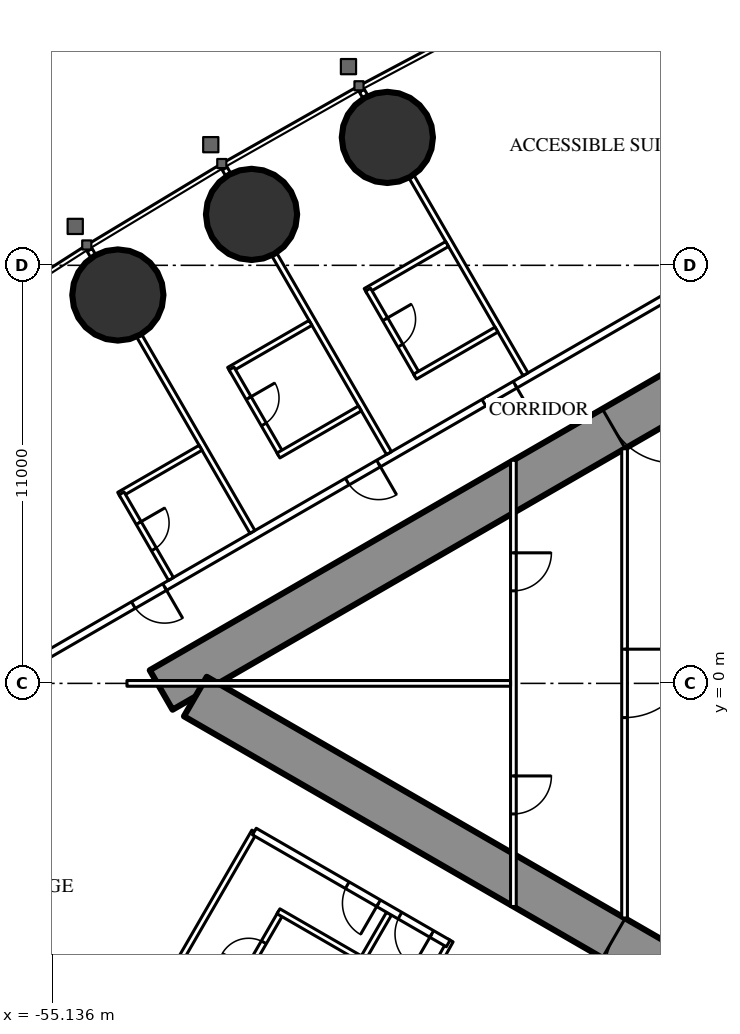
"""IFC4 building model, lengths in metres.
Left out: names, types, materials, properties, quantities, classifications, styles, units other than length and angle.
Written with IfcOpenShell. Run it as: python <this file> out.ifc"""

import sys

from ifc_helpers import new_model, si_unit, direction, frame, frame_2d, origin, origin_2d, place, context, subcontext, project, spatial, rectangle, circle, extrude, element, fill, save


model = new_model("IFC4")
c1 = context("Model", 3, precision=1e-05, world=origin(), true_north=direction((0.0, 1.0)))
c2 = subcontext(c1, "Body", "Model", "MODEL_VIEW")
j1 = project(units=[si_unit("LENGTHUNIT", "METRE"), si_unit("PLANEANGLEUNIT", "RADIAN")], contexts=[c1])
p1 = place(None, origin())
s1 = spatial("IfcSite", under=j1, at=p1, CompositionType="ELEMENT")
p2 = place(p1, origin())
s2 = spatial("IfcBuilding", under=s1, at=p2, CompositionType="ELEMENT")
p3 = place(p2, frame((0.0, 0.0, 236.9)))
s3 = spatial("IfcBuildingStorey", under=s2, at=p3, CompositionType="ELEMENT", Elevation=236.9)
for number, where, z_axis, x_axis in (
    (1, (-46.317, 14.365, 0.0), (0.0, 0.0, 1.0), (1.0, 0.0, 0.0)),
    (2, (-49.89, 12.34, 0.0), (0.0, 0.0, 1.0), (1.0, 0.0, 0.0)),
    (3, (-53.408, 10.219, 0.0), (0.0, 0.0, 1.0), (1.0, 0.0, 0.0)),
):
    element("IfcColumn", number, at=place(p3, frame(where, z_axis=z_axis, x_axis=x_axis)), inside=s3, PredefinedType="COLUMN", context=c2, shape_type="SweptSolid", body=[
        extrude(circle(Radius=1.2, at=origin_2d()), origin(), (0.0, 0.0, 1.0), 3.6),
    ])
p4 = place(p3, frame((-27.2, 14.3, 0.0), z_axis=(0.0, 0.0, 1.0), x_axis=(-0.866026593062, -0.499997940104, 0.0)))
e4 = element("IfcWall", 4, at=p4, inside=s3, PredefinedType="SHEAR", context=c2, shape_type="SweptSolid", body=[
    extrude(rectangle(XDim=28.946, YDim=1.2, at=frame_2d((14.473, 0.0))), origin(), (0.0, 0.0, 1.0), 3.6),
])
p5 = place(p4, frame((4.6, 0.0, 0.0)))
e5 = element("IfcOpeningElement", 5, at=p5, cuts=e4, PredefinedType="OPENING", context=c2, shape_type="SweptSolid", body=[
    extrude(rectangle(XDim=1.0, YDim=2.2, at=frame_2d((0.5, 1.1))), frame((0.0, 0.61, 0.0), z_axis=(0.0, -1.0, 0.0), x_axis=(1.0, 0.0, 0.0)), (0.0, 0.0, 1.0), 1.22),
])
p6 = place(p4, frame((13.395, 0.0, 0.0)))
e6 = element("IfcOpeningElement", 6, at=p6, cuts=e4, PredefinedType="OPENING", context=c2, shape_type="SweptSolid", body=[
    extrude(rectangle(XDim=1.8, YDim=2.2, at=frame_2d((0.9, 1.1))), frame((0.0, 0.61, 0.0), z_axis=(0.0, -1.0, 0.0), x_axis=(1.0, 0.0, 0.0)), (0.0, 0.0, 1.0), 1.22),
])
p7 = place(p3, frame((-27.2, -14.3, 0.0), z_axis=(0.0, 0.0, 1.0), x_axis=(-0.866024021859, 0.500002393557, 0.0)))
e7 = element("IfcWall", 7, at=p7, inside=s3, PredefinedType="SHEAR", context=c2, shape_type="SweptSolid", body=[
    extrude(rectangle(XDim=27.907, YDim=1.2, at=frame_2d((13.954, 0.0))), origin(), (0.0, 0.0, 1.0), 3.6),
])
p8 = place(p7, frame((4.6, 0.0, 0.0)))
e8 = element("IfcOpeningElement", 8, at=p8, cuts=e7, PredefinedType="OPENING", context=c2, shape_type="SweptSolid", body=[
    extrude(rectangle(XDim=1.0, YDim=2.2, at=frame_2d((0.5, 1.1))), frame((0.0, 0.61, 0.0), z_axis=(0.0, -1.0, 0.0), x_axis=(1.0, 0.0, 0.0)), (0.0, 0.0, 1.0), 1.22),
])
p9 = place(p7, frame((13.395, 0.0, 0.0)))
e9 = element("IfcOpeningElement", 9, at=p9, cuts=e7, PredefinedType="OPENING", context=c2, shape_type="SweptSolid", body=[
    extrude(rectangle(XDim=1.8, YDim=2.2, at=frame_2d((0.9, 1.1))), frame((0.0, 0.61, 0.0), z_axis=(0.0, -1.0, 0.0), x_axis=(1.0, 0.0, 0.0)), (0.0, 0.0, 1.0), 1.22),
])
p10 = place(p3, frame((-28.737, 16.068, 0.0), z_axis=(0.0, 0.0, 1.0), x_axis=(-0.866026057212, -0.499998868229, 0.0)))
e10 = element("IfcWall", 10, at=p10, inside=s3, PredefinedType="PARTITIONING", context=c2, shape_type="SweptSolid", body=[
    extrude(rectangle(XDim=32.137, YDim=0.2, at=frame_2d((16.068, 0.0))), origin(), (0.0, 0.0, 1.0), 3.35),
])
p11 = place(p10, frame((1.08, 0.0, 0.0)))
e11 = element("IfcOpeningElement", 11, at=p11, cuts=e10, PredefinedType="OPENING", context=c2, shape_type="SweptSolid", body=[
    extrude(rectangle(XDim=1.8, YDim=2.03, at=frame_2d((0.9, 1.015))), frame((0.0, 0.11, 0.0), z_axis=(0.0, -1.0, 0.0), x_axis=(1.0, 0.0, 0.0)), (0.0, 0.0, 1.0), 0.22),
])
p12 = place(p10, frame((6.86, 0.0, 0.0)))
e12 = element("IfcOpeningElement", 12, at=p12, cuts=e10, PredefinedType="OPENING", context=c2, shape_type="SweptSolid", body=[
    extrude(rectangle(XDim=1.0, YDim=2.2, at=frame_2d((0.5, 1.1))), frame((0.0, 0.11, 0.0), z_axis=(0.0, -1.0, 0.0), x_axis=(1.0, 0.0, 0.0)), (0.0, 0.0, 1.0), 0.22),
])
p13 = place(p10, frame((16.418, 0.0, 0.0)))
e13 = element("IfcOpeningElement", 13, at=p13, cuts=e10, PredefinedType="OPENING", context=c2, shape_type="SweptSolid", body=[
    extrude(rectangle(XDim=0.95, YDim=2.2, at=frame_2d((0.475, 1.1))), frame((0.0, 0.11, 0.0), z_axis=(0.0, -1.0, 0.0), x_axis=(1.0, 0.0, 0.0)), (0.0, 0.0, 1.0), 0.22),
])
p14 = place(p10, frame((20.567, 0.0, 0.0)))
e14 = element("IfcOpeningElement", 14, at=p14, cuts=e10, PredefinedType="OPENING", context=c2, shape_type="SweptSolid", body=[
    extrude(rectangle(XDim=0.95, YDim=2.2, at=frame_2d((0.475, 1.1))), frame((0.0, 0.11, 0.0), z_axis=(0.0, -1.0, 0.0), x_axis=(1.0, 0.0, 0.0)), (0.0, 0.0, 1.0), 0.22),
])
p15 = place(p10, frame((27.065, 0.0, 0.0)))
e15 = element("IfcOpeningElement", 15, at=p15, cuts=e10, PredefinedType="OPENING", context=c2, shape_type="SweptSolid", body=[
    extrude(rectangle(XDim=0.95, YDim=2.2, at=frame_2d((0.475, 1.1))), frame((0.0, 0.11, 0.0), z_axis=(0.0, -1.0, 0.0), x_axis=(1.0, 0.0, 0.0)), (0.0, 0.0, 1.0), 0.22),
])
p16 = place(p3, frame((-42.68, 8.134, 0.0), z_axis=(0.0, 0.0, 1.0), x_axis=(-0.499984479505, 0.866034364361, 0.0)))
e16 = element("IfcWall", 16, at=p16, inside=s3, PredefinedType="PARTITIONING", context=c2, shape_type="SweptSolid", body=[
    extrude(rectangle(XDim=5.995, YDim=0.15, at=frame_2d((2.998, 0.0))), origin(), (0.0, 0.0, 1.0), 2.45),
])
p17 = place(p3, frame((-46.898, 15.439, 0.0), z_axis=(0.0, 0.0, 1.0), x_axis=(-0.500232303069, 0.865891241997, 0.0)))
e17 = element("IfcWall", 17, at=p17, inside=s3, PredefinedType="PARTITIONING", context=c2, shape_type="SweptSolid", body=[
    extrude(rectangle(XDim=0.18, YDim=0.15, at=frame_2d((0.09, 0.0))), origin(), (0.0, 0.0, 1.0), 2.45),
])
p18 = place(p3, frame((-46.274, 6.059, 0.0), z_axis=(0.0, 0.0, 1.0), x_axis=(-0.500020471368, 0.866013584312, 0.0)))
e18 = element("IfcWall", 18, at=p18, inside=s3, PredefinedType="PARTITIONING", context=c2, shape_type="SweptSolid", body=[
    extrude(rectangle(XDim=6.028, YDim=0.15, at=frame_2d((3.014, 0.0))), origin(), (0.0, 0.0, 1.0), 2.45),
])
p19 = place(p3, frame((-50.508, 13.392, 0.0), z_axis=(0.0, 0.0, 1.0), x_axis=(-0.499644091975, 0.866230789891, 0.0)))
e19 = element("IfcWall", 19, at=p19, inside=s3, PredefinedType="PARTITIONING", context=c2, shape_type="SweptSolid", body=[
    extrude(rectangle(XDim=0.18, YDim=0.15, at=frame_2d((0.09, 0.0))), origin(), (0.0, 0.0, 1.0), 2.45),
])
p20 = place(p3, frame((-49.866, 3.985, 0.0), z_axis=(0.0, 0.0, 1.0), x_axis=(-0.500000694566, 0.866025002776, 0.0)))
e20 = element("IfcWall", 20, at=p20, inside=s3, PredefinedType="PARTITIONING", context=c2, shape_type="SweptSolid", body=[
    extrude(rectangle(XDim=5.95, YDim=0.15, at=frame_2d((2.975, 0.0))), origin(), (0.0, 0.0, 1.0), 2.45),
])
p21 = place(p3, frame((-54.061, 11.25, 0.0), z_axis=(0.0, 0.0, 1.0), x_axis=(-0.500391173478, 0.865799441849, 0.0)))
e21 = element("IfcWall", 21, at=p21, inside=s3, PredefinedType="PARTITIONING", context=c2, shape_type="SweptSolid", body=[
    extrude(rectangle(XDim=0.179, YDim=0.15, at=frame_2d((0.089, 0.0))), origin(), (0.0, 0.0, 1.0), 2.45),
])
p22 = place(p3, frame((-46.274, -6.059, 0.0), z_axis=(0.0, 0.0, 1.0), x_axis=(-0.500020471368, -0.866013584312, 0.0)))
e22 = element("IfcWall", 22, at=p22, inside=s3, PredefinedType="PARTITIONING", context=c2, shape_type="SweptSolid", body=[
    extrude(rectangle(XDim=6.028, YDim=0.15, at=frame_2d((3.014, 0.0))), origin(), (0.0, 0.0, 1.0), 2.45),
])
p23 = place(p3, frame((-49.816, -3.898, 0.0), z_axis=(0.0, 0.0, 1.0), x_axis=(-0.500001913541, -0.866024298998, 0.0)))
e23 = element("IfcWall", 23, at=p23, inside=s3, PredefinedType="PARTITIONING", context=c2, shape_type="SweptSolid", body=[
    extrude(rectangle(XDim=6.05, YDim=0.15, at=frame_2d((3.025, 0.0))), origin(), (0.0, 0.0, 1.0), 2.45),
])
p24 = place(p3, frame((-44.652, -6.764, 0.0), z_axis=(0.0, 0.0, 1.0), x_axis=(-0.485424724123, -0.874278466629, 0.0)))
e24 = element("IfcWall", 24, at=p24, inside=s3, PredefinedType="PARTITIONING", context=c2, shape_type="SweptSolid", body=[
    extrude(rectangle(XDim=1.805, YDim=0.15, at=frame_2d((0.903, 0.0))), origin(), (0.0, 0.0, 1.0), 3.35),
])
p25 = place(p3, frame((-44.745, 11.56, 0.0), z_axis=(0.0, 0.0, 1.0), x_axis=(-0.866006523861, -0.500032699561, 0.0)))
e25 = element("IfcWall", 25, at=p25, inside=s3, PredefinedType="PARTITIONING", context=c2, shape_type="SweptSolid", body=[
    extrude(rectangle(XDim=2.475, YDim=0.15, at=frame_2d((1.237, 0.0))), origin(), (0.0, 0.0, 1.0), 3.35),
])
p26 = place(p3, frame((-45.524, 8.109, 0.0), z_axis=(0.0, 0.0, 1.0), x_axis=(-0.49997716683, 0.86603858612, 0.0)))
e26 = element("IfcWall", 26, at=p26, inside=s3, PredefinedType="PARTITIONING", context=c2, shape_type="SweptSolid", body=[
    extrude(rectangle(XDim=2.6, YDim=0.15, at=frame_2d((1.3, 0.0))), origin(), (0.0, 0.0, 1.0), 3.35),
])
p27 = place(p26, frame((0.9, 0.0, 0.0)))
e27 = element("IfcOpeningElement", 27, at=p27, cuts=e26, PredefinedType="OPENING", context=c2, shape_type="SweptSolid", body=[
    extrude(rectangle(XDim=0.8, YDim=2.2, at=frame_2d((0.4, 1.1))), frame((0.0, 0.085, 0.0), z_axis=(0.0, -1.0, 0.0), x_axis=(1.0, 0.0, 0.0)), (0.0, 0.0, 1.0), 0.17),
])
p28 = place(p3, frame((-43.445, 9.309, 0.0), z_axis=(0.0, 0.0, 1.0), x_axis=(-0.866031185235, -0.4999899861, 0.0)))
e28 = element("IfcWall", 28, at=p28, inside=s3, PredefinedType="PARTITIONING", context=c2, shape_type="SweptSolid", body=[
    extrude(rectangle(XDim=2.475, YDim=0.15, at=frame_2d((1.238, 0.0))), origin(), (0.0, 0.0, 1.0), 3.35),
])
p29 = place(p3, frame((-48.339, 9.486, 0.0), z_axis=(0.0, 0.0, 1.0), x_axis=(-0.866006523861, -0.500032699561, 0.0)))
e29 = element("IfcWall", 29, at=p29, inside=s3, PredefinedType="PARTITIONING", context=c2, shape_type="SweptSolid", body=[
    extrude(rectangle(XDim=2.475, YDim=0.15, at=frame_2d((1.237, 0.0))), origin(), (0.0, 0.0, 1.0), 3.35),
])
p30 = place(p3, frame((-49.117, 6.034, 0.0), z_axis=(0.0, 0.0, 1.0), x_axis=(-0.500006934395, 0.866021400173, 0.0)))
e30 = element("IfcWall", 30, at=p30, inside=s3, PredefinedType="PARTITIONING", context=c2, shape_type="SweptSolid", body=[
    extrude(rectangle(XDim=2.6, YDim=0.15, at=frame_2d((1.3, 0.0))), origin(), (0.0, 0.0, 1.0), 3.35),
])
p31 = place(p30, frame((0.9, 0.0, 0.0)))
e31 = element("IfcOpeningElement", 31, at=p31, cuts=e30, PredefinedType="OPENING", context=c2, shape_type="SweptSolid", body=[
    extrude(rectangle(XDim=0.8, YDim=2.2, at=frame_2d((0.4, 1.1))), frame((0.0, 0.085, 0.0), z_axis=(0.0, -1.0, 0.0), x_axis=(1.0, 0.0, 0.0)), (0.0, 0.0, 1.0), 0.17),
])
for number, where, z_axis, x_axis in (
    (32, (-47.039, 7.234, 0.0), (0.0, 0.0, 1.0), (-0.866, -0.5, 0.0)),
    (33, (-51.231, 6.199, 0.0), (0.0, 0.0, 1.0), (-0.866, -0.5, 0.0)),
):
    element("IfcWall", number, at=place(p3, frame(where, z_axis=z_axis, x_axis=x_axis)), inside=s3, PredefinedType="PARTITIONING", context=c2, shape_type="SweptSolid", body=[
        extrude(rectangle(XDim=2.475, YDim=0.15, at=frame_2d((1.238, 0.0))), origin(), (0.0, 0.0, 1.0), 3.35),
    ])
p32 = place(p3, frame((-52.01, 2.747, 0.0), z_axis=(0.0, 0.0, 1.0), x_axis=(-0.500006934395, 0.866021400173, 0.0)))
e34 = element("IfcWall", 34, at=p32, inside=s3, PredefinedType="PARTITIONING", context=c2, shape_type="SweptSolid", body=[
    extrude(rectangle(XDim=2.6, YDim=0.15, at=frame_2d((1.3, 0.0))), origin(), (0.0, 0.0, 1.0), 3.35),
])
p33 = place(p32, frame((0.9, 0.0, 0.0)))
e35 = element("IfcOpeningElement", 35, at=p33, cuts=e34, PredefinedType="OPENING", context=c2, shape_type="SweptSolid", body=[
    extrude(rectangle(XDim=0.8, YDim=2.2, at=frame_2d((0.4, 1.1))), frame((0.0, 0.085, 0.0), z_axis=(0.0, -1.0, 0.0), x_axis=(1.0, 0.0, 0.0)), (0.0, 0.0, 1.0), 0.17),
])
p34 = place(p3, frame((-49.117, -6.034, 0.0), z_axis=(0.0, 0.0, 1.0), x_axis=(-0.500006934395, -0.866021400173, 0.0)))
e36 = element("IfcWall", 36, at=p34, inside=s3, PredefinedType="PARTITIONING", context=c2, shape_type="SweptSolid", body=[
    extrude(rectangle(XDim=2.6, YDim=0.15, at=frame_2d((1.3, 0.0))), origin(), (0.0, 0.0, 1.0), 3.35),
])
p35 = place(p34, frame((0.9, 0.0, 0.0)))
e37 = element("IfcOpeningElement", 37, at=p35, cuts=e36, PredefinedType="OPENING", context=c2, shape_type="SweptSolid", body=[
    extrude(rectangle(XDim=0.8, YDim=2.2, at=frame_2d((0.4, 1.1))), frame((0.0, 0.085, 0.0), z_axis=(0.0, -1.0, 0.0), x_axis=(1.0, 0.0, 0.0)), (0.0, 0.0, 1.0), 0.17),
])
p36 = place(p3, frame((-47.039, -7.234, 0.0), z_axis=(0.0, 0.0, 1.0), x_axis=(-0.866073894602, 0.499916002032, 0.0)))
e38 = element("IfcWall", 38, at=p36, inside=s3, PredefinedType="PARTITIONING", context=c2, shape_type="SweptSolid", body=[
    extrude(rectangle(XDim=2.475, YDim=0.15, at=frame_2d((1.238, 0.0))), origin(), (0.0, 0.0, 1.0), 2.5),
])
p37 = place(p3, frame((-44.715, -6.844, 0.0), z_axis=(0.0, 0.0, 1.0), x_axis=(-0.866020627653, 0.50000827241, 0.0)))
e39 = element("IfcWall", 39, at=p37, inside=s3, PredefinedType="PARTITIONING", context=c2, shape_type="SweptSolid", body=[
    extrude(rectangle(XDim=5.891, YDim=0.2, at=frame_2d((2.945, 0.0))), origin(), (0.0, 0.0, 1.0), 3.35),
])
p38 = place(p37, frame((2.117, 0.0, 0.0)))
e40 = element("IfcOpeningElement", 40, at=p38, cuts=e39, PredefinedType="OPENING", context=c2, shape_type="SweptSolid", body=[
    extrude(rectangle(XDim=0.95, YDim=2.2, at=frame_2d((0.475, 1.1))), frame((0.0, 0.11, 0.0), z_axis=(0.0, -1.0, 0.0), x_axis=(1.0, 0.0, 0.0)), (0.0, 0.0, 1.0), 0.22),
])
p39 = place(p37, frame((0.5, 0.0, 0.0)))
e41 = element("IfcOpeningElement", 41, at=p39, cuts=e39, PredefinedType="OPENING", context=c2, shape_type="SweptSolid", body=[
    extrude(rectangle(XDim=0.967, YDim=2.2, at=frame_2d((0.483, 1.1))), frame((0.0, 0.11, 0.0), z_axis=(0.0, -1.0, 0.0), x_axis=(1.0, 0.0, 0.0)), (0.0, 0.0, 1.0), 0.22),
])
p40 = place(p3, frame((-40.075, 6.174, 0.0), z_axis=(0.0, 0.0, 1.0), x_axis=(0.0, -1.0, 0.0)))
e42 = element("IfcWall", 42, at=p40, inside=s3, PredefinedType="PARTITIONING", context=c2, shape_type="SweptSolid", body=[
    extrude(rectangle(XDim=12.348, YDim=0.15, at=frame_2d((6.174, 0.0))), origin(), (0.0, 0.0, 1.0), 3.35),
])
p41 = place(p40, frame((5.274, 0.0, 0.0)))
e43 = element("IfcOpeningElement", 43, at=p41, cuts=e42, PredefinedType="OPENING", context=c2, shape_type="SweptSolid", body=[
    extrude(rectangle(XDim=1.8, YDim=2.2, at=frame_2d((0.9, 1.1))), frame((0.0, 0.085, 0.0), z_axis=(0.0, -1.0, 0.0), x_axis=(1.0, 0.0, 0.0)), (0.0, 0.0, 1.0), 0.17),
])
p42 = place(p3, frame((-43.0, 5.871, 0.0), z_axis=(0.0, 0.0, 1.0), x_axis=(0.0, -1.0, 0.0)))
e44 = element("IfcWall", 44, at=p42, inside=s3, PredefinedType="PARTITIONING", context=c2, shape_type="SweptSolid", body=[
    extrude(rectangle(XDim=11.741, YDim=0.15, at=frame_2d((5.871, 0.0))), origin(), (0.0, 0.0, 1.0), 3.35),
])
p43 = place(p42, frame((2.435, 0.0, 0.0)))
e45 = element("IfcOpeningElement", 45, at=p43, cuts=e44, PredefinedType="OPENING", context=c2, shape_type="SweptSolid", body=[
    extrude(rectangle(XDim=1.0, YDim=2.2, at=frame_2d((0.5, 1.1))), frame((0.0, 0.085, 0.0), z_axis=(0.0, -1.0, 0.0), x_axis=(1.0, 0.0, 0.0)), (0.0, 0.0, 1.0), 0.17),
])
p44 = place(p42, frame((8.306, 0.0, 0.0)))
e46 = element("IfcOpeningElement", 46, at=p44, cuts=e44, PredefinedType="OPENING", context=c2, shape_type="SweptSolid", body=[
    extrude(rectangle(XDim=1.0, YDim=2.2, at=frame_2d((0.5, 1.1))), frame((0.0, 0.085, 0.0), z_axis=(0.0, -1.0, 0.0), x_axis=(1.0, 0.0, 0.0)), (0.0, 0.0, 1.0), 0.17),
])
p45 = place(p3, frame((-43.075, 0.0, 0.0), z_axis=(0.0, 0.0, 1.0), x_axis=(-1.0, 0.0, 0.0)))
e47 = element("IfcWall", 47, at=p45, inside=s3, PredefinedType="PARTITIONING", context=c2, shape_type="SweptSolid", body=[
    extrude(rectangle(XDim=10.093, YDim=0.15, at=frame_2d((5.047, 0.0))), origin(), (0.0, 0.0, 1.0), 2.45),
])
p46 = place(p27, origin())
e48 = element("IfcDoor", 48, at=p46, inside=s3, OperationType="SINGLE_SWING_RIGHT", PredefinedType="DOOR", context=c2, shape_type="SweptSolid", body=[
    extrude(rectangle(XDim=0.8, YDim=2.2, at=frame_2d((0.4, 1.1))), frame((0.0, 0.025, 0.0), z_axis=(0.0, -1.0, 0.0), x_axis=(1.0, 0.0, 0.0)), (0.0, 0.0, 1.0), 0.05),
])
fill(e27, e48)
p47 = place(p13, origin())
e49 = element("IfcDoor", 49, at=p47, inside=s3, OperationType="SINGLE_SWING_LEFT", PredefinedType="DOOR", context=c2, shape_type="SweptSolid", body=[
    extrude(rectangle(XDim=0.95, YDim=2.2, at=frame_2d((0.475, 1.1))), frame((0.0, 0.025, 0.0), z_axis=(0.0, -1.0, 0.0), x_axis=(1.0, 0.0, 0.0)), (0.0, 0.0, 1.0), 0.05),
])
fill(e13, e49)
p48 = place(p31, origin())
e50 = element("IfcDoor", 50, at=p48, inside=s3, OperationType="SINGLE_SWING_RIGHT", PredefinedType="DOOR", context=c2, shape_type="SweptSolid", body=[
    extrude(rectangle(XDim=0.8, YDim=2.2, at=frame_2d((0.4, 1.1))), frame((0.0, 0.025, 0.0), z_axis=(0.0, -1.0, 0.0), x_axis=(1.0, 0.0, 0.0)), (0.0, 0.0, 1.0), 0.05),
])
fill(e31, e50)
p49 = place(p14, origin())
e51 = element("IfcDoor", 51, at=p49, inside=s3, OperationType="SINGLE_SWING_LEFT", PredefinedType="DOOR", context=c2, shape_type="SweptSolid", body=[
    extrude(rectangle(XDim=0.95, YDim=2.2, at=frame_2d((0.475, 1.1))), frame((0.0, 0.025, 0.0), z_axis=(0.0, -1.0, 0.0), x_axis=(1.0, 0.0, 0.0)), (0.0, 0.0, 1.0), 0.05),
])
fill(e14, e51)
p50 = place(p33, origin())
e52 = element("IfcDoor", 52, at=p50, inside=s3, OperationType="SINGLE_SWING_RIGHT", PredefinedType="DOOR", context=c2, shape_type="SweptSolid", body=[
    extrude(rectangle(XDim=0.8, YDim=2.2, at=frame_2d((0.4, 1.1))), frame((0.0, 0.025, 0.0), z_axis=(0.0, -1.0, 0.0), x_axis=(1.0, 0.0, 0.0)), (0.0, 0.0, 1.0), 0.05),
])
fill(e35, e52)
p51 = place(p15, origin())
e53 = element("IfcDoor", 53, at=p51, inside=s3, OperationType="SINGLE_SWING_LEFT", PredefinedType="DOOR", context=c2, shape_type="SweptSolid", body=[
    extrude(rectangle(XDim=0.95, YDim=2.2, at=frame_2d((0.475, 1.1))), frame((0.0, 0.025, 0.0), z_axis=(0.0, -1.0, 0.0), x_axis=(1.0, 0.0, 0.0)), (0.0, 0.0, 1.0), 0.05),
])
fill(e15, e53)
p52 = place(p35, origin())
e54 = element("IfcDoor", 54, at=p52, inside=s3, OperationType="SINGLE_SWING_RIGHT", PredefinedType="DOOR", context=c2, shape_type="SweptSolid", body=[
    extrude(rectangle(XDim=0.8, YDim=2.2, at=frame_2d((0.4, 1.1))), frame((0.0, 0.025, 0.0), z_axis=(0.0, -1.0, 0.0), x_axis=(1.0, 0.0, 0.0)), (0.0, 0.0, 1.0), 0.05),
])
fill(e37, e54)
p53 = place(p38, origin())
e55 = element("IfcDoor", 55, at=p53, inside=s3, OperationType="SINGLE_SWING_LEFT", PredefinedType="DOOR", context=c2, shape_type="SweptSolid", body=[
    extrude(rectangle(XDim=0.95, YDim=2.2, at=frame_2d((0.475, 1.1))), frame((0.0, 0.025, 0.0), z_axis=(0.0, -1.0, 0.0), x_axis=(1.0, 0.0, 0.0)), (0.0, 0.0, 1.0), 0.05),
])
fill(e40, e55)
p54 = place(p39, origin())
e56 = element("IfcDoor", 56, at=p54, inside=s3, OperationType="SINGLE_SWING_LEFT", PredefinedType="DOOR", context=c2, shape_type="SweptSolid", body=[
    extrude(rectangle(XDim=0.967, YDim=2.2, at=frame_2d((0.483, 1.1))), frame((0.0, 0.025, 0.0), z_axis=(0.0, -1.0, 0.0), x_axis=(1.0, 0.0, 0.0)), (0.0, 0.0, 1.0), 0.05),
])
fill(e41, e56)
p55 = place(p41, origin())
e57 = element("IfcDoor", 57, at=p55, inside=s3, OperationType="DOUBLE_DOOR_SINGLE_SWING", PredefinedType="DOOR", context=c2, shape_type="SweptSolid", body=[
    extrude(rectangle(XDim=1.8, YDim=2.2, at=frame_2d((0.9, 1.1))), frame((0.0, 0.025, 0.0), z_axis=(0.0, -1.0, 0.0), x_axis=(1.0, 0.0, 0.0)), (0.0, 0.0, 1.0), 0.05),
])
fill(e43, e57)
p56 = place(p43, origin())
e58 = element("IfcDoor", 58, at=p56, inside=s3, OperationType="SINGLE_SWING_LEFT", PredefinedType="DOOR", context=c2, shape_type="SweptSolid", body=[
    extrude(rectangle(XDim=1.0, YDim=2.2, at=frame_2d((0.5, 1.1))), frame((0.0, 0.025, 0.0), z_axis=(0.0, -1.0, 0.0), x_axis=(1.0, 0.0, 0.0)), (0.0, 0.0, 1.0), 0.05),
])
fill(e45, e58)
p57 = place(p44, origin())
e59 = element("IfcDoor", 59, at=p57, inside=s3, OperationType="SINGLE_SWING_LEFT", PredefinedType="DOOR", context=c2, shape_type="SweptSolid", body=[
    extrude(rectangle(XDim=1.0, YDim=2.2, at=frame_2d((0.5, 1.1))), frame((0.0, 0.025, 0.0), z_axis=(0.0, -1.0, 0.0), x_axis=(1.0, 0.0, 0.0)), (0.0, 0.0, 1.0), 0.05),
])
fill(e46, e59)
p58 = place(p6, origin())
e60 = element("IfcDoor", 60, at=p58, inside=s3, OperationType="DOUBLE_DOOR_SINGLE_SWING", PredefinedType="DOOR", context=c2, shape_type="SweptSolid", body=[
    extrude(rectangle(XDim=1.8, YDim=2.2, at=frame_2d((0.9, 1.1))), frame((0.0, 0.025, 0.0), z_axis=(0.0, -1.0, 0.0), x_axis=(1.0, 0.0, 0.0)), (0.0, 0.0, 1.0), 0.05),
])
fill(e6, e60)
p59 = place(p9, origin())
e61 = element("IfcDoor", 61, at=p59, inside=s3, OperationType="DOUBLE_DOOR_SINGLE_SWING", PredefinedType="DOOR", context=c2, shape_type="SweptSolid", body=[
    extrude(rectangle(XDim=1.8, YDim=2.2, at=frame_2d((0.9, 1.1))), frame((0.0, 0.025, 0.0), z_axis=(0.0, -1.0, 0.0), x_axis=(1.0, 0.0, 0.0)), (0.0, 0.0, 1.0), 0.05),
])
fill(e9, e61)
save(model, sys.argv[1])
